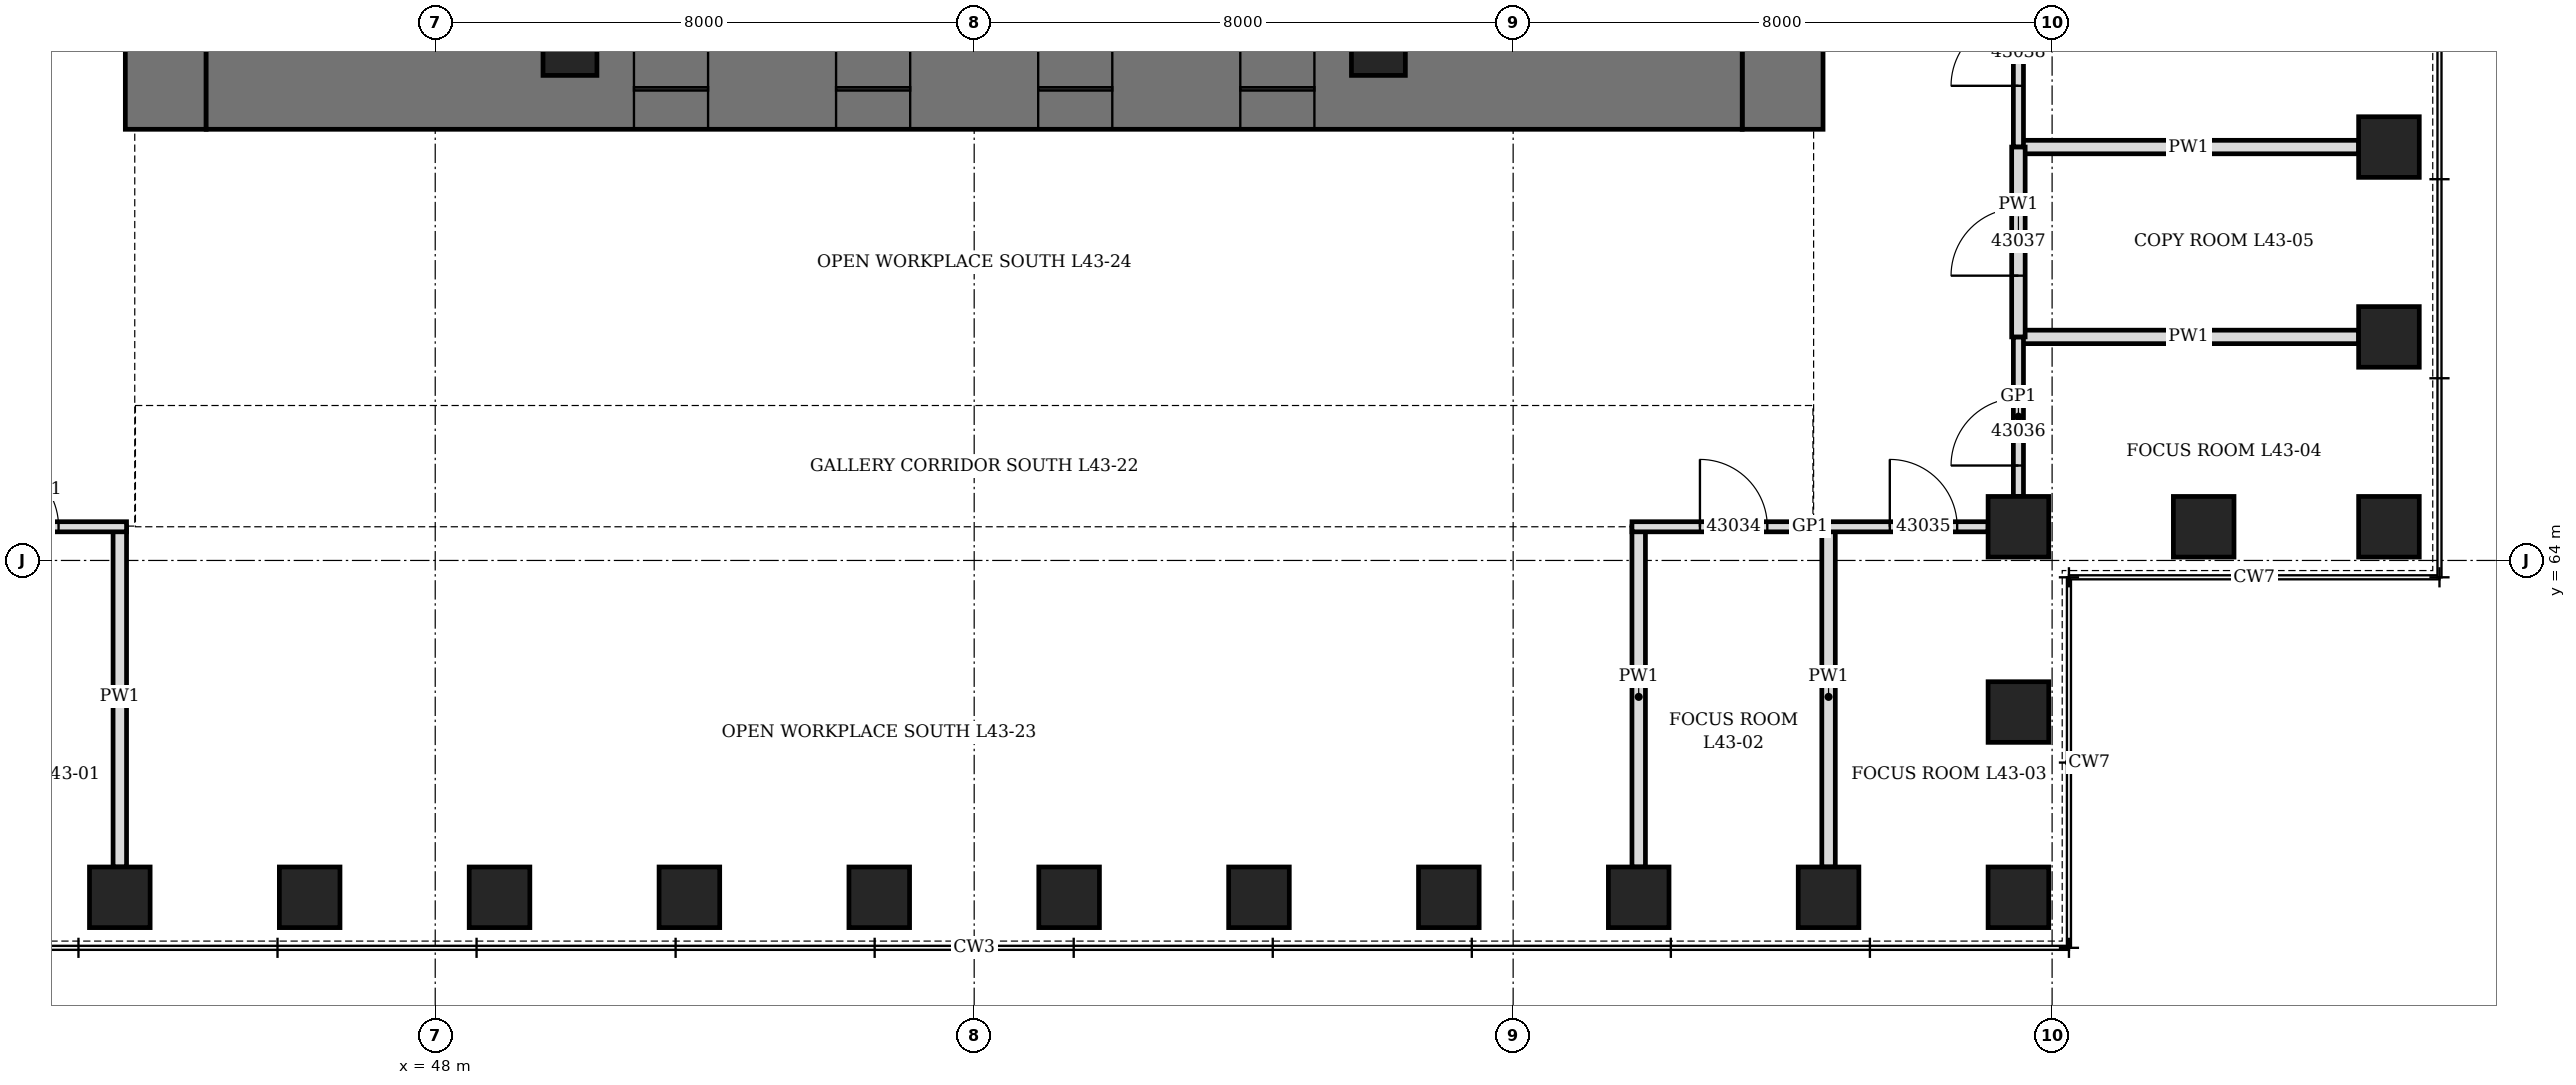
"""IFC4 building model, lengths in metres.
Left out: names, types, materials, properties, quantities, classifications, styles, units other than length and angle.
Written with IfcOpenShell. Run it as: python <this file> out.ifc"""

import sys

from ifc_helpers import new_model, si_unit, direction, frame, frame_2d, origin, origin_2d, place, context, subcontext, project, spatial, rectangle, hollow_rectangle, extrude, element, fill, save


model = new_model("IFC4")
c1 = context("Model", 3, precision=1e-05, world=origin(), true_north=direction((0.0, 1.0)))
c2 = subcontext(c1, "Body", "Model", "MODEL_VIEW")
j1 = project(units=[si_unit("LENGTHUNIT", "METRE"), si_unit("PLANEANGLEUNIT", "RADIAN")], contexts=[c1])
p1 = place(None, origin())
s1 = spatial("IfcSite", under=j1, at=p1, CompositionType="ELEMENT")
p2 = place(p1, origin())
s2 = spatial("IfcBuilding", under=s1, at=p2, CompositionType="ELEMENT")
p3 = place(p2, frame((0.0, 0.0, 193.9)))
s3 = spatial("IfcBuildingStorey", under=s2, at=p3, CompositionType="ELEMENT", Elevation=193.9)
for number, where, z_axis, x_axis in (
    (1, (43.318, 59.0, 0.0), (0.0, 0.0, 1.0), (1.0, 0.0, 0.0)),
    (2, (46.136, 59.0, 0.0), (0.0, 0.0, 1.0), (1.0, 0.0, 0.0)),
    (3, (48.955, 59.0, 0.0), (0.0, 0.0, 1.0), (1.0, 0.0, 0.0)),
    (4, (51.773, 59.0, 0.0), (0.0, 0.0, 1.0), (1.0, 0.0, 0.0)),
    (5, (54.591, 59.0, 0.0), (0.0, 0.0, 1.0), (1.0, 0.0, 0.0)),
    (6, (57.409, 59.0, 0.0), (0.0, 0.0, 1.0), (1.0, 0.0, 0.0)),
    (7, (60.227, 59.0, 0.0), (0.0, 0.0, 1.0), (1.0, 0.0, 0.0)),
    (8, (63.045, 59.0, 0.0), (0.0, 0.0, 1.0), (1.0, 0.0, 0.0)),
    (9, (65.864, 59.0, 0.0), (0.0, 0.0, 1.0), (1.0, 0.0, 0.0)),
    (10, (68.682, 59.0, 0.0), (0.0, 0.0, 1.0), (1.0, 0.0, 0.0)),
    (11, (71.5, 59.0, 0.0), (0.0, 0.0, 1.0), (0.0, 1.0, 0.0)),
    (12, (71.5, 61.75, 0.0), (0.0, 0.0, 1.0), (0.0, 1.0, 0.0)),
    (13, (71.5, 64.5, 0.0), (0.0, 0.0, 1.0), (1.0, 0.0, 0.0)),
    (14, (74.25, 64.5, 0.0), (0.0, 0.0, 1.0), (1.0, 0.0, 0.0)),
    (15, (77.0, 64.5, 0.0), (0.0, 0.0, 1.0), (0.0, 1.0, 0.0)),
    (16, (77.0, 67.318, 0.0), (0.0, 0.0, 1.0), (0.0, 1.0, 0.0)),
    (17, (77.0, 70.136, 0.0), (0.0, 0.0, 1.0), (0.0, 1.0, 0.0)),
):
    element("IfcColumn", number, at=place(p3, frame(where, z_axis=z_axis, x_axis=x_axis)), inside=s3, PredefinedType="COLUMN", context=c2, shape_type="SweptSolid", body=[
        extrude(hollow_rectangle(XDim=0.9, YDim=0.9, WallThickness=0.12, at=origin_2d()), origin(), (0.0, 0.0, 1.0), 4.2),
    ])
p4 = place(p3, frame((44.0, 70.4, 0.0), z_axis=(0.0, 0.0, 1.0), x_axis=(0.0, 1.0, 0.0)))
e18 = element("IfcWall", 18, at=p4, inside=s3, PredefinedType="SHEAR", context=c2, shape_type="SweptSolid", body=[
    extrude(rectangle(XDim=19.2, YDim=1.2, at=frame_2d((9.6, 0.0))), origin(), (0.0, 0.0, 1.0), 4.2),
])
p5 = place(p4, frame((8.6, 0.0, 0.0)))
e19 = element("IfcOpeningElement", 19, at=p5, cuts=e18, PredefinedType="OPENING", context=c2, shape_type="SweptSolid", body=[
    extrude(rectangle(XDim=2.0, YDim=2.4, at=frame_2d((1.0, 1.2))), frame((0.0, 0.61, 0.0), z_axis=(0.0, -1.0, 0.0), x_axis=(1.0, 0.0, 0.0)), (0.0, 0.0, 1.0), 1.22),
])
p6 = place(p3, frame((68.0, 70.4, 0.0), z_axis=(0.0, 0.0, 1.0), x_axis=(0.0, 1.0, 0.0)))
e20 = element("IfcWall", 20, at=p6, inside=s3, PredefinedType="SHEAR", context=c2, shape_type="SweptSolid", body=[
    extrude(rectangle(XDim=19.2, YDim=1.2, at=frame_2d((9.6, 0.0))), origin(), (0.0, 0.0, 1.0), 4.2),
])
p7 = place(p6, frame((8.6, 0.0, 0.0)))
e21 = element("IfcOpeningElement", 21, at=p7, cuts=e20, PredefinedType="OPENING", context=c2, shape_type="SweptSolid", body=[
    extrude(rectangle(XDim=2.0, YDim=2.4, at=frame_2d((1.0, 1.2))), frame((0.0, 0.61, 0.0), z_axis=(0.0, -1.0, 0.0), x_axis=(1.0, 0.0, 0.0)), (0.0, 0.0, 1.0), 1.22),
])
p8 = place(p3, frame((44.6, 71.0, 0.0), z_axis=(0.0, 0.0, 1.0), x_axis=(1.0, 0.0, 0.0)))
e22 = element("IfcWall", 22, at=p8, inside=s3, PredefinedType="SHEAR", context=c2, shape_type="SweptSolid", body=[
    extrude(rectangle(XDim=22.8, YDim=1.2, at=frame_2d((11.4, 0.0))), origin(), (0.0, 0.0, 1.0), 4.2),
])
p9 = place(p8, frame((6.35, 0.0, 0.0)))
e23 = element("IfcOpeningElement", 23, at=p9, cuts=e22, PredefinedType="OPENING", context=c2, shape_type="SweptSolid", body=[
    extrude(rectangle(XDim=1.1, YDim=2.2, at=frame_2d((0.55, 1.1))), frame((0.0, 0.61, 0.0), z_axis=(0.0, -1.0, 0.0), x_axis=(1.0, 0.0, 0.0)), (0.0, 0.0, 1.0), 1.22),
])
p10 = place(p8, frame((9.35, 0.0, 0.0)))
e24 = element("IfcOpeningElement", 24, at=p10, cuts=e22, PredefinedType="OPENING", context=c2, shape_type="SweptSolid", body=[
    extrude(rectangle(XDim=1.1, YDim=2.2, at=frame_2d((0.55, 1.1))), frame((0.0, 0.61, 0.0), z_axis=(0.0, -1.0, 0.0), x_axis=(1.0, 0.0, 0.0)), (0.0, 0.0, 1.0), 1.22),
])
p11 = place(p8, frame((12.35, 0.0, 0.0)))
e25 = element("IfcOpeningElement", 25, at=p11, cuts=e22, PredefinedType="OPENING", context=c2, shape_type="SweptSolid", body=[
    extrude(rectangle(XDim=1.1, YDim=2.2, at=frame_2d((0.55, 1.1))), frame((0.0, 0.61, 0.0), z_axis=(0.0, -1.0, 0.0), x_axis=(1.0, 0.0, 0.0)), (0.0, 0.0, 1.0), 1.22),
])
p12 = place(p8, frame((15.35, 0.0, 0.0)))
e26 = element("IfcOpeningElement", 26, at=p12, cuts=e22, PredefinedType="OPENING", context=c2, shape_type="SweptSolid", body=[
    extrude(rectangle(XDim=1.1, YDim=2.2, at=frame_2d((0.55, 1.1))), frame((0.0, 0.61, 0.0), z_axis=(0.0, -1.0, 0.0), x_axis=(1.0, 0.0, 0.0)), (0.0, 0.0, 1.0), 1.22),
])
for number, where, z_axis, x_axis in (
    (27, (50.0, 71.6, 0.0), (0.0, 0.0, 1.0), (1.0, 0.0, 0.0)),
    (28, (62.0, 71.6, 0.0), (0.0, 0.0, 1.0), (1.0, 0.0, 0.0)),
):
    element("IfcColumn", number, at=place(p3, frame(where, z_axis=z_axis, x_axis=x_axis)), inside=s3, PredefinedType="COLUMN", context=c2, shape_type="SweptSolid", body=[
        extrude(hollow_rectangle(XDim=0.8, YDim=0.8, WallThickness=0.1, at=origin_2d()), origin(), (0.0, 0.0, 1.0), 4.2),
    ])
for number, where, z_axis, x_axis in (
    (29, (43.318, 59.45, 0.0), (0.0, 0.0, 1.0), (0.0, 1.0, 0.0)),
    (30, (65.864, 59.45, 0.0), (0.0, 0.0, 1.0), (0.0, 1.0, 0.0)),
    (31, (68.682, 59.45, 0.0), (0.0, 0.0, 1.0), (0.0, 1.0, 0.0)),
    (32, (71.5, 67.318, 0.0), (0.0, 0.0, 1.0), (1.0, 0.0, 0.0)),
    (33, (71.5, 70.136, 0.0), (0.0, 0.0, 1.0), (1.0, 0.0, 0.0)),
):
    element("IfcWall", number, at=place(p3, frame(where, z_axis=z_axis, x_axis=x_axis)), inside=s3, PredefinedType="PARTITIONING", context=c2, shape_type="SweptSolid", body=[
        extrude(rectangle(XDim=5.05, YDim=0.2, at=frame_2d((2.525, 0.0))), origin(), (0.0, 0.0, 1.0), 3.428),
    ])
p13 = place(p3, frame((40.95, 64.5, 0.0), z_axis=(0.0, 0.0, 1.0), x_axis=(1.0, 0.0, 0.0)))
e34 = element("IfcWall", 34, at=p13, inside=s3, PredefinedType="PARTITIONING", context=c2, shape_type="SweptSolid", body=[
    extrude(rectangle(XDim=2.468, YDim=0.15, at=frame_2d((1.234, 0.0))), origin(), (0.0, 0.0, 1.0), 4.04),
])
p14 = place(p13, frame((0.459, 0.0, 0.0)))
e35 = element("IfcOpeningElement", 35, at=p14, cuts=e34, PredefinedType="OPENING", context=c2, shape_type="SweptSolid", body=[
    extrude(rectangle(XDim=1.0, YDim=2.4, at=frame_2d((0.5, 1.2))), frame((0.0, 0.085, 0.0), z_axis=(0.0, -1.0, 0.0), x_axis=(1.0, 0.0, 0.0)), (0.0, 0.0, 1.0), 0.17),
])
p15 = place(p3, frame((65.764, 64.5, 0.0), z_axis=(0.0, 0.0, 1.0), x_axis=(1.0, 0.0, 0.0)))
e36 = element("IfcWall", 36, at=p15, inside=s3, PredefinedType="PARTITIONING", context=c2, shape_type="SweptSolid", body=[
    extrude(rectangle(XDim=5.286, YDim=0.15, at=frame_2d((2.643, 0.0))), origin(), (0.0, 0.0, 1.0), 4.04),
])
p16 = place(p15, frame((1.009, 0.0, 0.0)))
e37 = element("IfcOpeningElement", 37, at=p16, cuts=e36, PredefinedType="OPENING", context=c2, shape_type="SweptSolid", body=[
    extrude(rectangle(XDim=1.0, YDim=2.4, at=frame_2d((0.5, 1.2))), frame((0.0, 0.085, 0.0), z_axis=(0.0, -1.0, 0.0), x_axis=(1.0, 0.0, 0.0)), (0.0, 0.0, 1.0), 0.17),
])
p17 = place(p15, frame((3.827, 0.0, 0.0)))
e38 = element("IfcOpeningElement", 38, at=p17, cuts=e36, PredefinedType="OPENING", context=c2, shape_type="SweptSolid", body=[
    extrude(rectangle(XDim=1.0, YDim=2.4, at=frame_2d((0.5, 1.2))), frame((0.0, 0.085, 0.0), z_axis=(0.0, -1.0, 0.0), x_axis=(1.0, 0.0, 0.0)), (0.0, 0.0, 1.0), 0.17),
])
p18 = place(p3, frame((71.5, 64.95, 0.0), z_axis=(0.0, 0.0, 1.0), x_axis=(0.0, 1.0, 0.0)))
e39 = element("IfcWall", 39, at=p18, inside=s3, PredefinedType="PARTITIONING", context=c2, shape_type="SweptSolid", body=[
    extrude(rectangle(XDim=2.368, YDim=0.15, at=frame_2d((1.184, 0.0))), origin(), (0.0, 0.0, 1.0), 4.04),
])
p19 = place(p18, frame((0.459, 0.0, 0.0)))
e40 = element("IfcOpeningElement", 40, at=p19, cuts=e39, PredefinedType="OPENING", context=c2, shape_type="SweptSolid", body=[
    extrude(rectangle(XDim=1.0, YDim=2.4, at=frame_2d((0.5, 1.2))), frame((0.0, 0.085, 0.0), z_axis=(0.0, -1.0, 0.0), x_axis=(1.0, 0.0, 0.0)), (0.0, 0.0, 1.0), 0.17),
])
p20 = place(p3, frame((71.5, 70.136, 0.0), z_axis=(0.0, 0.0, 1.0), x_axis=(0.0, 1.0, 0.0)))
e41 = element("IfcWall", 41, at=p20, inside=s3, PredefinedType="PARTITIONING", context=c2, shape_type="SweptSolid", body=[
    extrude(rectangle(XDim=24.914, YDim=0.15, at=frame_2d((12.457, 0.0))), origin(), (0.0, 0.0, 1.0), 4.04),
])
p21 = place(p20, frame((0.909, 0.0, 0.0)))
e42 = element("IfcOpeningElement", 42, at=p21, cuts=e41, PredefinedType="OPENING", context=c2, shape_type="SweptSolid", body=[
    extrude(rectangle(XDim=1.0, YDim=2.1, at=frame_2d((0.5, 1.05))), frame((0.0, 0.085, 0.0), z_axis=(0.0, -1.0, 0.0), x_axis=(1.0, 0.0, 0.0)), (0.0, 0.0, 1.0), 0.17),
])
p22 = place(p20, frame((6.545, 0.0, 0.0)))
e43 = element("IfcOpeningElement", 43, at=p22, cuts=e41, PredefinedType="OPENING", context=c2, shape_type="SweptSolid", body=[
    extrude(rectangle(XDim=1.0, YDim=2.1, at=frame_2d((0.5, 1.05))), frame((0.0, 0.085, 0.0), z_axis=(0.0, -1.0, 0.0), x_axis=(1.0, 0.0, 0.0)), (0.0, 0.0, 1.0), 0.17),
])
p23 = place(p20, frame((12.182, 0.0, 0.0)))
e44 = element("IfcOpeningElement", 44, at=p23, cuts=e41, PredefinedType="OPENING", context=c2, shape_type="SweptSolid", body=[
    extrude(rectangle(XDim=1.0, YDim=2.1, at=frame_2d((0.5, 1.05))), frame((0.0, 0.085, 0.0), z_axis=(0.0, -1.0, 0.0), x_axis=(1.0, 0.0, 0.0)), (0.0, 0.0, 1.0), 0.17),
])
p24 = place(p20, frame((17.818, 0.0, 0.0)))
e45 = element("IfcOpeningElement", 45, at=p24, cuts=e41, PredefinedType="OPENING", context=c2, shape_type="SweptSolid", body=[
    extrude(rectangle(XDim=1.0, YDim=2.1, at=frame_2d((0.5, 1.05))), frame((0.0, 0.085, 0.0), z_axis=(0.0, -1.0, 0.0), x_axis=(1.0, 0.0, 0.0)), (0.0, 0.0, 1.0), 0.17),
])
p25 = place(p20, frame((23.455, 0.0, 0.0)))
e46 = element("IfcOpeningElement", 46, at=p25, cuts=e41, PredefinedType="OPENING", context=c2, shape_type="SweptSolid", body=[
    extrude(rectangle(XDim=1.0, YDim=2.4, at=frame_2d((0.5, 1.2))), frame((0.0, 0.085, 0.0), z_axis=(0.0, -1.0, 0.0), x_axis=(1.0, 0.0, 0.0)), (0.0, 0.0, 1.0), 0.17),
])
p26 = place(p3, frame((71.5, 67.318, 0.0), z_axis=(0.0, 0.0, 1.0), x_axis=(0.0, 1.0, 0.0)))
e47 = element("IfcWall", 47, at=p26, inside=s3, PredefinedType="PARTITIONING", context=c2, shape_type="SweptSolid", body=[
    extrude(rectangle(XDim=2.818, YDim=0.2, at=frame_2d((1.409, 0.0))), origin(), (0.0, 0.0, 1.0), 4.04),
])
p27 = place(p26, frame((0.909, 0.0, 0.0)))
e48 = element("IfcOpeningElement", 48, at=p27, cuts=e47, PredefinedType="OPENING", context=c2, shape_type="SweptSolid", body=[
    extrude(rectangle(XDim=1.0, YDim=2.1, at=frame_2d((0.5, 1.05))), frame((0.0, 0.11, 0.0), z_axis=(0.0, -1.0, 0.0), x_axis=(1.0, 0.0, 0.0)), (0.0, 0.0, 1.0), 0.22),
])
p28 = place(p9, origin())
e49 = element("IfcDoor", 49, at=p28, inside=s3, OperationType="SLIDING_TO_LEFT", PredefinedType="DOOR", context=c2, shape_type="SweptSolid", body=[
    extrude(rectangle(XDim=1.1, YDim=2.2, at=frame_2d((0.55, 1.1))), frame((0.0, 0.35, 0.0), z_axis=(0.0, -1.0, 0.0), x_axis=(1.0, 0.0, 0.0)), (0.0, 0.0, 1.0), 0.7),
])
fill(e23, e49)
p29 = place(p10, origin())
e50 = element("IfcDoor", 50, at=p29, inside=s3, OperationType="SLIDING_TO_LEFT", PredefinedType="DOOR", context=c2, shape_type="SweptSolid", body=[
    extrude(rectangle(XDim=1.1, YDim=2.2, at=frame_2d((0.55, 1.1))), frame((0.0, 0.35, 0.0), z_axis=(0.0, -1.0, 0.0), x_axis=(1.0, 0.0, 0.0)), (0.0, 0.0, 1.0), 0.7),
])
fill(e24, e50)
p30 = place(p11, origin())
e51 = element("IfcDoor", 51, at=p30, inside=s3, OperationType="SLIDING_TO_LEFT", PredefinedType="DOOR", context=c2, shape_type="SweptSolid", body=[
    extrude(rectangle(XDim=1.1, YDim=2.2, at=frame_2d((0.55, 1.1))), frame((0.0, 0.35, 0.0), z_axis=(0.0, -1.0, 0.0), x_axis=(1.0, 0.0, 0.0)), (0.0, 0.0, 1.0), 0.7),
])
fill(e25, e51)
p31 = place(p12, origin())
e52 = element("IfcDoor", 52, at=p31, inside=s3, OperationType="SLIDING_TO_LEFT", PredefinedType="DOOR", context=c2, shape_type="SweptSolid", body=[
    extrude(rectangle(XDim=1.1, YDim=2.2, at=frame_2d((0.55, 1.1))), frame((0.0, 0.35, 0.0), z_axis=(0.0, -1.0, 0.0), x_axis=(1.0, 0.0, 0.0)), (0.0, 0.0, 1.0), 0.7),
])
fill(e26, e52)
p32 = place(p14, origin())
e53 = element("IfcDoor", 53, at=p32, inside=s3, OperationType="SINGLE_SWING_RIGHT", PredefinedType="DOOR", context=c2, shape_type="SweptSolid", body=[
    extrude(rectangle(XDim=1.0, YDim=2.4, at=frame_2d((0.5, 1.2))), frame((0.0, 0.075, 0.0), z_axis=(0.0, -1.0, 0.0), x_axis=(1.0, 0.0, 0.0)), (0.0, 0.0, 1.0), 0.149),
])
fill(e35, e53)
p33 = place(p16, origin())
e54 = element("IfcDoor", 54, at=p33, inside=s3, OperationType="SINGLE_SWING_RIGHT", PredefinedType="DOOR", context=c2, shape_type="SweptSolid", body=[
    extrude(rectangle(XDim=1.0, YDim=2.4, at=frame_2d((0.5, 1.2))), frame((0.0, 0.075, 0.0), z_axis=(0.0, -1.0, 0.0), x_axis=(1.0, 0.0, 0.0)), (0.0, 0.0, 1.0), 0.149),
])
fill(e37, e54)
p34 = place(p17, origin())
e55 = element("IfcDoor", 55, at=p34, inside=s3, OperationType="SINGLE_SWING_RIGHT", PredefinedType="DOOR", context=c2, shape_type="SweptSolid", body=[
    extrude(rectangle(XDim=1.0, YDim=2.4, at=frame_2d((0.5, 1.2))), frame((0.0, 0.075, 0.0), z_axis=(0.0, -1.0, 0.0), x_axis=(1.0, 0.0, 0.0)), (0.0, 0.0, 1.0), 0.149),
])
fill(e38, e55)
p35 = place(p19, origin())
e56 = element("IfcDoor", 56, at=p35, inside=s3, OperationType="SINGLE_SWING_RIGHT", PredefinedType="DOOR", context=c2, shape_type="SweptSolid", body=[
    extrude(rectangle(XDim=1.0, YDim=2.4, at=frame_2d((0.5, 1.2))), frame((0.0, 0.075, 0.0), z_axis=(0.0, -1.0, 0.0), x_axis=(1.0, 0.0, 0.0)), (0.0, 0.0, 1.0), 0.149),
])
fill(e40, e56)
p36 = place(p27, origin())
e57 = element("IfcDoor", 57, at=p36, inside=s3, OperationType="SINGLE_SWING_LEFT", PredefinedType="DOOR", context=c2, shape_type="SweptSolid", body=[
    extrude(rectangle(XDim=1.0, YDim=2.1, at=frame_2d((0.5, 1.05))), frame((0.0, 0.1, 0.0), z_axis=(0.0, -1.0, 0.0), x_axis=(1.0, 0.0, 0.0)), (0.0, 0.0, 1.0), 0.199),
])
fill(e48, e57)
p37 = place(p21, origin())
e58 = element("IfcDoor", 58, at=p37, inside=s3, OperationType="SINGLE_SWING_LEFT", PredefinedType="DOOR", context=c2, shape_type="SweptSolid", body=[
    extrude(rectangle(XDim=1.0, YDim=2.1, at=frame_2d((0.5, 1.05))), frame((0.0, 0.075, 0.0), z_axis=(0.0, -1.0, 0.0), x_axis=(1.0, 0.0, 0.0)), (0.0, 0.0, 1.0), 0.149),
])
fill(e42, e58)
save(model, sys.argv[1])
